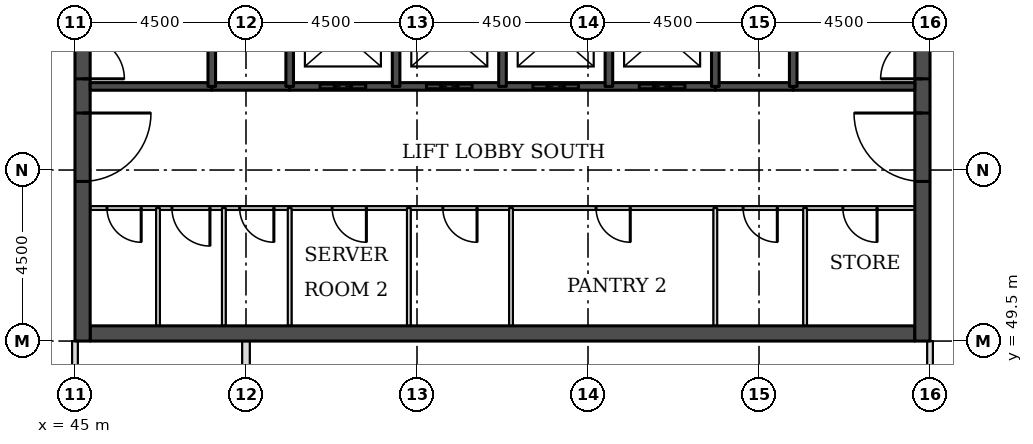
"""IFC4 building model, lengths in metres.
Left out: names, types, materials, properties, quantities, classifications, styles, units other than length and angle.
Written with IfcOpenShell. Run it as: python <this file> out.ifc"""

import sys

from ifc_helpers import new_model, si_unit, direction, frame, frame_2d, origin, place, context, subcontext, project, spatial, rectangle, extrude, element, fill, save


model = new_model("IFC4")
c1 = context("Model", 3, precision=1e-05, world=origin(), true_north=direction((0.0, 1.0)))
c2 = subcontext(c1, "Body", "Model", "MODEL_VIEW")
j1 = project(units=[si_unit("LENGTHUNIT", "METRE"), si_unit("PLANEANGLEUNIT", "RADIAN")], contexts=[c1])
p1 = place(None, origin())
s1 = spatial("IfcSite", under=j1, at=p1, CompositionType="ELEMENT")
p2 = place(p1, origin())
s2 = spatial("IfcBuilding", under=s1, at=p2, CompositionType="ELEMENT")
p3 = place(p2, frame((0.0, 0.0, 256.3)))
s3 = spatial("IfcBuildingStorey", under=s2, at=p3, CompositionType="ELEMENT", Elevation=256.3)
p4 = place(p3, frame((45.4, 49.7, 0.0), z_axis=(0.0, 0.0, 1.0), x_axis=(1.0, 0.0, 0.0)))
e1 = element("IfcWall", 1, at=p4, inside=s3, PredefinedType="SHEAR", context=c2, shape_type="SweptSolid", body=[
    extrude(rectangle(XDim=21.7, YDim=0.4, at=frame_2d((10.85, 0.0))), origin(), (0.0, 0.0, 1.0), 3.7),
])
p5 = place(p3, frame((45.2, 49.5, 0.0), z_axis=(0.0, 0.0, 1.0), x_axis=(0.0, 1.0, 0.0)))
e2 = element("IfcWall", 2, at=p5, inside=s3, PredefinedType="SHEAR", context=c2, shape_type="SweptSolid", body=[
    extrude(rectangle(XDim=22.5, YDim=0.4, at=frame_2d((11.25, 0.0))), origin(), (0.0, 0.0, 1.0), 3.7),
])
p6 = place(p5, frame((4.2, 0.0, 0.0)))
e3 = element("IfcOpeningElement", 3, at=p6, cuts=e2, PredefinedType="OPENING", context=c2, shape_type="SweptSolid", body=[
    extrude(rectangle(XDim=1.8, YDim=2.1, at=frame_2d((0.9, 1.05))), frame((0.0, 0.21, 0.0), z_axis=(0.0, -1.0, 0.0), x_axis=(1.0, 0.0, 0.0)), (0.0, 0.0, 1.0), 0.42),
])
p7 = place(p5, frame((6.9, 0.0, 0.0)))
e4 = element("IfcOpeningElement", 4, at=p7, cuts=e2, PredefinedType="OPENING", context=c2, shape_type="SweptSolid", body=[
    extrude(rectangle(XDim=1.1, YDim=2.1, at=frame_2d((0.55, 1.05))), frame((0.0, 0.21, 0.0), z_axis=(0.0, -1.0, 0.0), x_axis=(1.0, 0.0, 0.0)), (0.0, 0.0, 1.0), 0.42),
])
p8 = place(p5, frame((13.6, 0.0, 0.0)))
e5 = element("IfcOpeningElement", 5, at=p8, cuts=e2, PredefinedType="OPENING", context=c2, shape_type="SweptSolid", body=[
    extrude(rectangle(XDim=1.1, YDim=2.1, at=frame_2d((0.55, 1.05))), frame((0.0, 0.21, 0.0), z_axis=(0.0, -1.0, 0.0), x_axis=(1.0, 0.0, 0.0)), (0.0, 0.0, 1.0), 0.42),
])
p9 = place(p5, frame((16.5, 0.0, 0.0)))
e6 = element("IfcOpeningElement", 6, at=p9, cuts=e2, PredefinedType="OPENING", context=c2, shape_type="SweptSolid", body=[
    extrude(rectangle(XDim=1.8, YDim=2.1, at=frame_2d((0.9, 1.05))), frame((0.0, 0.21, 0.0), z_axis=(0.0, -1.0, 0.0), x_axis=(1.0, 0.0, 0.0)), (0.0, 0.0, 1.0), 0.42),
])
p10 = place(p3, frame((67.3, 49.5, 0.0), z_axis=(0.0, 0.0, 1.0), x_axis=(0.0, 1.0, 0.0)))
e7 = element("IfcWall", 7, at=p10, inside=s3, PredefinedType="SHEAR", context=c2, shape_type="SweptSolid", body=[
    extrude(rectangle(XDim=22.5, YDim=0.4, at=frame_2d((11.25, 0.0))), origin(), (0.0, 0.0, 1.0), 3.7),
])
p11 = place(p10, frame((4.2, 0.0, 0.0)))
e8 = element("IfcOpeningElement", 8, at=p11, cuts=e7, PredefinedType="OPENING", context=c2, shape_type="SweptSolid", body=[
    extrude(rectangle(XDim=1.8, YDim=2.1, at=frame_2d((0.9, 1.05))), frame((0.0, 0.21, 0.0), z_axis=(0.0, -1.0, 0.0), x_axis=(1.0, 0.0, 0.0)), (0.0, 0.0, 1.0), 0.42),
])
p12 = place(p10, frame((6.9, 0.0, 0.0)))
e9 = element("IfcOpeningElement", 9, at=p12, cuts=e7, PredefinedType="OPENING", context=c2, shape_type="SweptSolid", body=[
    extrude(rectangle(XDim=1.1, YDim=2.1, at=frame_2d((0.55, 1.05))), frame((0.0, 0.21, 0.0), z_axis=(0.0, -1.0, 0.0), x_axis=(1.0, 0.0, 0.0)), (0.0, 0.0, 1.0), 0.42),
])
p13 = place(p10, frame((13.6, 0.0, 0.0)))
e10 = element("IfcOpeningElement", 10, at=p13, cuts=e7, PredefinedType="OPENING", context=c2, shape_type="SweptSolid", body=[
    extrude(rectangle(XDim=1.1, YDim=2.1, at=frame_2d((0.55, 1.05))), frame((0.0, 0.21, 0.0), z_axis=(0.0, -1.0, 0.0), x_axis=(1.0, 0.0, 0.0)), (0.0, 0.0, 1.0), 0.42),
])
p14 = place(p10, frame((16.5, 0.0, 0.0)))
e11 = element("IfcOpeningElement", 11, at=p14, cuts=e7, PredefinedType="OPENING", context=c2, shape_type="SweptSolid", body=[
    extrude(rectangle(XDim=1.8, YDim=2.1, at=frame_2d((0.9, 1.05))), frame((0.0, 0.21, 0.0), z_axis=(0.0, -1.0, 0.0), x_axis=(1.0, 0.0, 0.0)), (0.0, 0.0, 1.0), 0.42),
])
p15 = place(p3, frame((45.0, 45.0, 0.0), z_axis=(0.0, 0.0, 1.0), x_axis=(0.0, 1.0, 0.0)))
e12 = element("IfcWall", 12, at=p15, inside=s3, PredefinedType="PARTITIONING", context=c2, shape_type="SweptSolid", body=[
    extrude(rectangle(XDim=4.5, YDim=0.15, at=frame_2d((2.25, 0.0))), origin(), (0.0, 0.0, 1.0), 3.022),
])
p16 = place(p3, frame((49.5, 46.5, 0.0), z_axis=(0.0, 0.0, 1.0), x_axis=(0.0, 1.0, 0.0)))
e13 = element("IfcWall", 13, at=p16, inside=s3, PredefinedType="PARTITIONING", context=c2, shape_type="SweptSolid", body=[
    extrude(rectangle(XDim=3.0, YDim=0.2, at=frame_2d((1.5, 0.0))), origin(), (0.0, 0.0, 1.0), 3.55),
])
p17 = place(p3, frame((67.5, 48.0, 0.0), z_axis=(0.0, 0.0, 1.0), x_axis=(0.0, 1.0, 0.0)))
e14 = element("IfcWall", 14, at=p17, inside=s3, PredefinedType="PARTITIONING", context=c2, shape_type="SweptSolid", body=[
    extrude(rectangle(XDim=1.5, YDim=0.15, at=frame_2d((0.75, 0.0))), origin(), (0.0, 0.0, 1.0), 3.022),
])
p18 = place(p3, frame((45.4, 53.0, 0.0), z_axis=(0.0, 0.0, 1.0), x_axis=(1.0, 0.0, 0.0)))
e15 = element("IfcWall", 15, at=p18, inside=s3, PredefinedType="PARTITIONING", context=c2, shape_type="SweptSolid", body=[
    extrude(rectangle(XDim=21.7, YDim=0.1, at=frame_2d((10.85, 0.0))), origin(), (0.0, 0.0, 1.0), 3.55),
])
p19 = place(p18, frame((19.806, 0.0, 0.0)))
e16 = element("IfcOpeningElement", 16, at=p19, cuts=e15, PredefinedType="OPENING", context=c2, shape_type="SweptSolid", body=[
    extrude(rectangle(XDim=0.9, YDim=2.1, at=frame_2d((0.45, 1.05))), frame((0.0, 0.06, 0.0), z_axis=(0.0, -1.0, 0.0), x_axis=(1.0, 0.0, 0.0)), (0.0, 0.0, 1.0), 0.12),
])
p20 = place(p18, frame((17.181, 0.0, 0.0)))
e17 = element("IfcOpeningElement", 17, at=p20, cuts=e15, PredefinedType="OPENING", context=c2, shape_type="SweptSolid", body=[
    extrude(rectangle(XDim=0.9, YDim=2.1, at=frame_2d((0.45, 1.05))), frame((0.0, 0.06, 0.0), z_axis=(0.0, -1.0, 0.0), x_axis=(1.0, 0.0, 0.0)), (0.0, 0.0, 1.0), 0.12),
])
p21 = place(p18, frame((0.442, 0.0, 0.0)))
e18 = element("IfcOpeningElement", 18, at=p21, cuts=e15, PredefinedType="OPENING", context=c2, shape_type="SweptSolid", body=[
    extrude(rectangle(XDim=0.9, YDim=2.1, at=frame_2d((0.45, 1.05))), frame((0.0, 0.06, 0.0), z_axis=(0.0, -1.0, 0.0), x_axis=(1.0, 0.0, 0.0)), (0.0, 0.0, 1.0), 0.12),
])
p22 = place(p18, frame((2.151, 0.0, 0.0)))
e19 = element("IfcOpeningElement", 19, at=p22, cuts=e15, PredefinedType="OPENING", context=c2, shape_type="SweptSolid", body=[
    extrude(rectangle(XDim=1.0, YDim=2.1, at=frame_2d((0.5, 1.05))), frame((0.0, 0.06, 0.0), z_axis=(0.0, -1.0, 0.0), x_axis=(1.0, 0.0, 0.0)), (0.0, 0.0, 1.0), 0.12),
])
p23 = place(p18, frame((3.934, 0.0, 0.0)))
e20 = element("IfcOpeningElement", 20, at=p23, cuts=e15, PredefinedType="OPENING", context=c2, shape_type="SweptSolid", body=[
    extrude(rectangle(XDim=0.9, YDim=2.1, at=frame_2d((0.45, 1.05))), frame((0.0, 0.06, 0.0), z_axis=(0.0, -1.0, 0.0), x_axis=(1.0, 0.0, 0.0)), (0.0, 0.0, 1.0), 0.12),
])
p24 = place(p18, frame((6.368, 0.0, 0.0)))
e21 = element("IfcOpeningElement", 21, at=p24, cuts=e15, PredefinedType="OPENING", context=c2, shape_type="SweptSolid", body=[
    extrude(rectangle(XDim=0.9, YDim=2.1, at=frame_2d((0.45, 1.05))), frame((0.0, 0.06, 0.0), z_axis=(0.0, -1.0, 0.0), x_axis=(1.0, 0.0, 0.0)), (0.0, 0.0, 1.0), 0.12),
])
p25 = place(p18, frame((9.28, 0.0, 0.0)))
e22 = element("IfcOpeningElement", 22, at=p25, cuts=e15, PredefinedType="OPENING", context=c2, shape_type="SweptSolid", body=[
    extrude(rectangle(XDim=0.9, YDim=2.1, at=frame_2d((0.45, 1.05))), frame((0.0, 0.06, 0.0), z_axis=(0.0, -1.0, 0.0), x_axis=(1.0, 0.0, 0.0)), (0.0, 0.0, 1.0), 0.12),
])
p26 = place(p18, frame((13.312, 0.0, 0.0)))
e23 = element("IfcOpeningElement", 23, at=p26, cuts=e15, PredefinedType="OPENING", context=c2, shape_type="SweptSolid", body=[
    extrude(rectangle(XDim=0.9, YDim=2.1, at=frame_2d((0.45, 1.05))), frame((0.0, 0.06, 0.0), z_axis=(0.0, -1.0, 0.0), x_axis=(1.0, 0.0, 0.0)), (0.0, 0.0, 1.0), 0.12),
])
for number, where, z_axis, x_axis in (
    (24, (48.6, 56.2, 0.0), (0.0, 0.0, 1.0), (1.0, 0.0, 0.0)),
    (25, (61.85, 56.2, 0.0), (0.0, 0.0, 1.0), (1.0, 0.0, 0.0)),
):
    element("IfcWall", number, at=place(p3, frame(where, z_axis=z_axis, x_axis=x_axis)), inside=s3, PredefinedType="SOLIDWALL", context=c2, shape_type="SweptSolid", body=[
        extrude(rectangle(XDim=2.05, YDim=0.2, at=frame_2d((1.025, 0.0))), origin(), (0.0, 0.0, 1.0), 3.55),
    ])
p27 = place(p3, frame((45.4, 56.2, 0.0), z_axis=(0.0, 0.0, 1.0), x_axis=(1.0, 0.0, 0.0)))
e26 = element("IfcWall", 26, at=p27, inside=s3, PredefinedType="SOLIDWALL", context=c2, shape_type="SweptSolid", body=[
    extrude(rectangle(XDim=3.2, YDim=0.2, at=frame_2d((1.6, 0.0))), origin(), (0.0, 0.0, 1.0), 3.55),
])
p28 = place(p3, frame((50.65, 56.2, 0.0), z_axis=(0.0, 0.0, 1.0), x_axis=(1.0, 0.0, 0.0)))
e27 = element("IfcWall", 27, at=p28, inside=s3, PredefinedType="SOLIDWALL", context=c2, shape_type="SweptSolid", body=[
    extrude(rectangle(XDim=11.2, YDim=0.2, at=frame_2d((5.6, 0.0))), origin(), (0.0, 0.0, 1.0), 3.55),
])
p29 = place(p28, frame((0.8, 0.0, 0.0)))
e28 = element("IfcOpeningElement", 28, at=p29, cuts=e27, PredefinedType="OPENING", context=c2, shape_type="SweptSolid", body=[
    extrude(rectangle(XDim=1.2, YDim=2.1, at=frame_2d((0.6, 1.05))), frame((0.0, 0.11, 0.0), z_axis=(0.0, -1.0, 0.0), x_axis=(1.0, 0.0, 0.0)), (0.0, 0.0, 1.0), 0.22),
])
p30 = place(p28, frame((3.6, 0.0, 0.0)))
e29 = element("IfcOpeningElement", 29, at=p30, cuts=e27, PredefinedType="OPENING", context=c2, shape_type="SweptSolid", body=[
    extrude(rectangle(XDim=1.2, YDim=2.1, at=frame_2d((0.6, 1.05))), frame((0.0, 0.11, 0.0), z_axis=(0.0, -1.0, 0.0), x_axis=(1.0, 0.0, 0.0)), (0.0, 0.0, 1.0), 0.22),
])
p31 = place(p28, frame((6.4, 0.0, 0.0)))
e30 = element("IfcOpeningElement", 30, at=p31, cuts=e27, PredefinedType="OPENING", context=c2, shape_type="SweptSolid", body=[
    extrude(rectangle(XDim=1.2, YDim=2.1, at=frame_2d((0.6, 1.05))), frame((0.0, 0.11, 0.0), z_axis=(0.0, -1.0, 0.0), x_axis=(1.0, 0.0, 0.0)), (0.0, 0.0, 1.0), 0.22),
])
p32 = place(p28, frame((9.2, 0.0, 0.0)))
e31 = element("IfcOpeningElement", 31, at=p32, cuts=e27, PredefinedType="OPENING", context=c2, shape_type="SweptSolid", body=[
    extrude(rectangle(XDim=1.2, YDim=2.1, at=frame_2d((0.6, 1.05))), frame((0.0, 0.11, 0.0), z_axis=(0.0, -1.0, 0.0), x_axis=(1.0, 0.0, 0.0)), (0.0, 0.0, 1.0), 0.22),
])
p33 = place(p3, frame((63.9, 56.2, 0.0), z_axis=(0.0, 0.0, 1.0), x_axis=(1.0, 0.0, 0.0)))
e32 = element("IfcWall", 32, at=p33, inside=s3, PredefinedType="SOLIDWALL", context=c2, shape_type="SweptSolid", body=[
    extrude(rectangle(XDim=3.2, YDim=0.2, at=frame_2d((1.6, 0.0))), origin(), (0.0, 0.0, 1.0), 3.55),
])
p34 = place(p3, frame((47.185, 49.9, 0.0), z_axis=(0.0, 0.0, 1.0), x_axis=(0.0, 1.0, 0.0)))
e33 = element("IfcWall", 33, at=p34, inside=s3, PredefinedType="PARTITIONING", context=c2, shape_type="SweptSolid", body=[
    extrude(rectangle(XDim=3.1, YDim=0.1, at=frame_2d((1.55, 0.0))), origin(), (0.0, 0.0, 1.0), 3.55),
])
p35 = place(p3, frame((48.6, 56.2, 0.0), z_axis=(0.0, 0.0, 1.0), x_axis=(0.0, 1.0, 0.0)))
e34 = element("IfcWall", 34, at=p35, inside=s3, PredefinedType="SOLIDWALL", context=c2, shape_type="SweptSolid", body=[
    extrude(rectangle(XDim=5.8, YDim=0.2, at=frame_2d((2.9, 0.0))), origin(), (0.0, 0.0, 1.0), 3.55),
])
for number, where, z_axis, x_axis in (
    (35, (48.917, 49.9, 0.0), (0.0, 0.0, 1.0), (0.0, 1.0, 0.0)),
    (36, (50.65, 49.9, 0.0), (0.0, 0.0, 1.0), (0.0, 1.0, 0.0)),
):
    element("IfcWall", number, at=place(p3, frame(where, z_axis=z_axis, x_axis=x_axis)), inside=s3, PredefinedType="PARTITIONING", context=c2, shape_type="SweptSolid", body=[
        extrude(rectangle(XDim=3.1, YDim=0.1, at=frame_2d((1.55, 0.0))), origin(), (0.0, 0.0, 1.0), 3.55),
    ])
for number, where, z_axis, x_axis in (
    (37, (50.65, 56.2, 0.0), (0.0, 0.0, 1.0), (0.0, 1.0, 0.0)),
    (38, (53.45, 56.2, 0.0), (0.0, 0.0, 1.0), (0.0, 1.0, 0.0)),
):
    element("IfcWall", number, at=place(p3, frame(where, z_axis=z_axis, x_axis=x_axis)), inside=s3, PredefinedType="SOLIDWALL", context=c2, shape_type="SweptSolid", body=[
        extrude(rectangle(XDim=2.8, YDim=0.2, at=frame_2d((1.4, 0.0))), origin(), (0.0, 0.0, 1.0), 3.55),
    ])
p36 = place(p3, frame((53.786, 49.9, 0.0), z_axis=(0.0, 0.0, 1.0), x_axis=(0.0, 1.0, 0.0)))
e39 = element("IfcWall", 39, at=p36, inside=s3, PredefinedType="PARTITIONING", context=c2, shape_type="SweptSolid", body=[
    extrude(rectangle(XDim=3.1, YDim=0.1, at=frame_2d((1.55, 0.0))), origin(), (0.0, 0.0, 1.0), 3.55),
])
p37 = place(p3, frame((56.25, 56.2, 0.0), z_axis=(0.0, 0.0, 1.0), x_axis=(0.0, 1.0, 0.0)))
e40 = element("IfcWall", 40, at=p37, inside=s3, PredefinedType="SOLIDWALL", context=c2, shape_type="SweptSolid", body=[
    extrude(rectangle(XDim=2.8, YDim=0.2, at=frame_2d((1.4, 0.0))), origin(), (0.0, 0.0, 1.0), 3.55),
])
p38 = place(p3, frame((56.474, 49.9, 0.0), z_axis=(0.0, 0.0, 1.0), x_axis=(0.0, 1.0, 0.0)))
e41 = element("IfcWall", 41, at=p38, inside=s3, PredefinedType="PARTITIONING", context=c2, shape_type="SweptSolid", body=[
    extrude(rectangle(XDim=3.1, YDim=0.1, at=frame_2d((1.55, 0.0))), origin(), (0.0, 0.0, 1.0), 3.55),
])
p39 = place(p3, frame((59.05, 56.2, 0.0), z_axis=(0.0, 0.0, 1.0), x_axis=(0.0, 1.0, 0.0)))
e42 = element("IfcWall", 42, at=p39, inside=s3, PredefinedType="SOLIDWALL", context=c2, shape_type="SweptSolid", body=[
    extrude(rectangle(XDim=2.8, YDim=0.2, at=frame_2d((1.4, 0.0))), origin(), (0.0, 0.0, 1.0), 3.55),
])
p40 = place(p3, frame((61.85, 49.9, 0.0), z_axis=(0.0, 0.0, 1.0), x_axis=(0.0, 1.0, 0.0)))
e43 = element("IfcWall", 43, at=p40, inside=s3, PredefinedType="PARTITIONING", context=c2, shape_type="SweptSolid", body=[
    extrude(rectangle(XDim=3.1, YDim=0.1, at=frame_2d((1.55, 0.0))), origin(), (0.0, 0.0, 1.0), 3.55),
])
p41 = place(p3, frame((61.85, 56.2, 0.0), z_axis=(0.0, 0.0, 1.0), x_axis=(0.0, 1.0, 0.0)))
e44 = element("IfcWall", 44, at=p41, inside=s3, PredefinedType="SOLIDWALL", context=c2, shape_type="SweptSolid", body=[
    extrude(rectangle(XDim=2.8, YDim=0.2, at=frame_2d((1.4, 0.0))), origin(), (0.0, 0.0, 1.0), 3.55),
])
p42 = place(p3, frame((63.9, 56.2, 0.0), z_axis=(0.0, 0.0, 1.0), x_axis=(0.0, 1.0, 0.0)))
e45 = element("IfcWall", 45, at=p42, inside=s3, PredefinedType="SOLIDWALL", context=c2, shape_type="SweptSolid", body=[
    extrude(rectangle(XDim=5.8, YDim=0.2, at=frame_2d((2.9, 0.0))), origin(), (0.0, 0.0, 1.0), 3.55),
])
p43 = place(p3, frame((64.212, 49.9, 0.0), z_axis=(0.0, 0.0, 1.0), x_axis=(0.0, 1.0, 0.0)))
e46 = element("IfcWall", 46, at=p43, inside=s3, PredefinedType="PARTITIONING", context=c2, shape_type="SweptSolid", body=[
    extrude(rectangle(XDim=3.1, YDim=0.1, at=frame_2d((1.55, 0.0))), origin(), (0.0, 0.0, 1.0), 3.55),
])
p44 = place(p29, origin())
e47 = element("IfcDoor", 47, at=p44, inside=s3, OperationType="DOUBLE_DOOR_SLIDING", PredefinedType="DOOR", context=c2, shape_type="SweptSolid", body=[
    extrude(rectangle(XDim=1.2, YDim=2.1, at=frame_2d((0.6, 1.05))), frame((0.0, 0.025, 0.0), z_axis=(0.0, -1.0, 0.0), x_axis=(1.0, 0.0, 0.0)), (0.0, 0.0, 1.0), 0.05),
])
fill(e28, e47)
p45 = place(p30, origin())
e48 = element("IfcDoor", 48, at=p45, inside=s3, OperationType="DOUBLE_DOOR_SLIDING", PredefinedType="DOOR", context=c2, shape_type="SweptSolid", body=[
    extrude(rectangle(XDim=1.2, YDim=2.1, at=frame_2d((0.6, 1.05))), frame((0.0, 0.025, 0.0), z_axis=(0.0, -1.0, 0.0), x_axis=(1.0, 0.0, 0.0)), (0.0, 0.0, 1.0), 0.05),
])
fill(e29, e48)
p46 = place(p31, origin())
e49 = element("IfcDoor", 49, at=p46, inside=s3, OperationType="DOUBLE_DOOR_SLIDING", PredefinedType="DOOR", context=c2, shape_type="SweptSolid", body=[
    extrude(rectangle(XDim=1.2, YDim=2.1, at=frame_2d((0.6, 1.05))), frame((0.0, 0.025, 0.0), z_axis=(0.0, -1.0, 0.0), x_axis=(1.0, 0.0, 0.0)), (0.0, 0.0, 1.0), 0.05),
])
fill(e30, e49)
p47 = place(p32, origin())
e50 = element("IfcDoor", 50, at=p47, inside=s3, OperationType="DOUBLE_DOOR_SLIDING", PredefinedType="DOOR", context=c2, shape_type="SweptSolid", body=[
    extrude(rectangle(XDim=1.2, YDim=2.1, at=frame_2d((0.6, 1.05))), frame((0.0, 0.025, 0.0), z_axis=(0.0, -1.0, 0.0), x_axis=(1.0, 0.0, 0.0)), (0.0, 0.0, 1.0), 0.05),
])
fill(e31, e50)
p48 = place(p6, frame((1.8, 0.0, 0.0), z_axis=(0.0, 0.0, 1.0), x_axis=(-1.0, 0.0, 0.0)))
e51 = element("IfcDoor", 51, at=p48, inside=s3, OperationType="SINGLE_SWING_LEFT", PredefinedType="DOOR", context=c2, shape_type="SweptSolid", body=[
    extrude(rectangle(XDim=1.8, YDim=2.1, at=frame_2d((0.9, 1.05))), frame((0.0, 0.025, 0.0), z_axis=(0.0, -1.0, 0.0), x_axis=(1.0, 0.0, 0.0)), (0.0, 0.0, 1.0), 0.05),
])
fill(e3, e51)
p49 = place(p7, frame((1.1, 0.0, 0.0), z_axis=(0.0, 0.0, 1.0), x_axis=(-1.0, 0.0, 0.0)))
e52 = element("IfcDoor", 52, at=p49, inside=s3, OperationType="SINGLE_SWING_RIGHT", PredefinedType="DOOR", context=c2, shape_type="SweptSolid", body=[
    extrude(rectangle(XDim=1.1, YDim=2.1, at=frame_2d((0.55, 1.05))), frame((0.0, 0.025, 0.0), z_axis=(0.0, -1.0, 0.0), x_axis=(1.0, 0.0, 0.0)), (0.0, 0.0, 1.0), 0.05),
])
fill(e4, e52)
p50 = place(p11, origin())
e53 = element("IfcDoor", 53, at=p50, inside=s3, OperationType="SINGLE_SWING_RIGHT", PredefinedType="DOOR", context=c2, shape_type="SweptSolid", body=[
    extrude(rectangle(XDim=1.8, YDim=2.1, at=frame_2d((0.9, 1.05))), frame((0.0, 0.025, 0.0), z_axis=(0.0, -1.0, 0.0), x_axis=(1.0, 0.0, 0.0)), (0.0, 0.0, 1.0), 0.05),
])
fill(e8, e53)
p51 = place(p12, origin())
e54 = element("IfcDoor", 54, at=p51, inside=s3, OperationType="SINGLE_SWING_LEFT", PredefinedType="DOOR", context=c2, shape_type="SweptSolid", body=[
    extrude(rectangle(XDim=1.1, YDim=2.1, at=frame_2d((0.55, 1.05))), frame((0.0, 0.025, 0.0), z_axis=(0.0, -1.0, 0.0), x_axis=(1.0, 0.0, 0.0)), (0.0, 0.0, 1.0), 0.05),
])
fill(e9, e54)
p52 = place(p19, frame((0.9, 0.0, 0.0), z_axis=(0.0, 0.0, 1.0), x_axis=(-1.0, 0.0, 0.0)))
e55 = element("IfcDoor", 55, at=p52, inside=s3, OperationType="SINGLE_SWING_LEFT", PredefinedType="DOOR", context=c2, shape_type="SweptSolid", body=[
    extrude(rectangle(XDim=0.9, YDim=2.1, at=frame_2d((0.45, 1.05))), frame((0.0, 0.025, 0.0), z_axis=(0.0, -1.0, 0.0), x_axis=(1.0, 0.0, 0.0)), (0.0, 0.0, 1.0), 0.05),
])
fill(e16, e55)
p53 = place(p20, frame((0.9, 0.0, 0.0), z_axis=(0.0, 0.0, 1.0), x_axis=(-1.0, 0.0, 0.0)))
e56 = element("IfcDoor", 56, at=p53, inside=s3, OperationType="SINGLE_SWING_LEFT", PredefinedType="DOOR", context=c2, shape_type="SweptSolid", body=[
    extrude(rectangle(XDim=0.9, YDim=2.1, at=frame_2d((0.45, 1.05))), frame((0.0, 0.025, 0.0), z_axis=(0.0, -1.0, 0.0), x_axis=(1.0, 0.0, 0.0)), (0.0, 0.0, 1.0), 0.05),
])
fill(e17, e56)
p54 = place(p21, frame((0.9, 0.0, 0.0), z_axis=(0.0, 0.0, 1.0), x_axis=(-1.0, 0.0, 0.0)))
e57 = element("IfcDoor", 57, at=p54, inside=s3, OperationType="SINGLE_SWING_LEFT", PredefinedType="DOOR", context=c2, shape_type="SweptSolid", body=[
    extrude(rectangle(XDim=0.9, YDim=2.1, at=frame_2d((0.45, 1.05))), frame((0.0, 0.025, 0.0), z_axis=(0.0, -1.0, 0.0), x_axis=(1.0, 0.0, 0.0)), (0.0, 0.0, 1.0), 0.05),
])
fill(e18, e57)
p55 = place(p22, frame((1.0, 0.0, 0.0), z_axis=(0.0, 0.0, 1.0), x_axis=(-1.0, 0.0, 0.0)))
e58 = element("IfcDoor", 58, at=p55, inside=s3, OperationType="SINGLE_SWING_LEFT", PredefinedType="DOOR", context=c2, shape_type="SweptSolid", body=[
    extrude(rectangle(XDim=1.0, YDim=2.1, at=frame_2d((0.5, 1.05))), frame((0.0, 0.025, 0.0), z_axis=(0.0, -1.0, 0.0), x_axis=(1.0, 0.0, 0.0)), (0.0, 0.0, 1.0), 0.05),
])
fill(e19, e58)
p56 = place(p23, frame((0.9, 0.0, 0.0), z_axis=(0.0, 0.0, 1.0), x_axis=(-1.0, 0.0, 0.0)))
e59 = element("IfcDoor", 59, at=p56, inside=s3, OperationType="SINGLE_SWING_LEFT", PredefinedType="DOOR", context=c2, shape_type="SweptSolid", body=[
    extrude(rectangle(XDim=0.9, YDim=2.1, at=frame_2d((0.45, 1.05))), frame((0.0, 0.025, 0.0), z_axis=(0.0, -1.0, 0.0), x_axis=(1.0, 0.0, 0.0)), (0.0, 0.0, 1.0), 0.05),
])
fill(e20, e59)
p57 = place(p24, frame((0.9, 0.0, 0.0), z_axis=(0.0, 0.0, 1.0), x_axis=(-1.0, 0.0, 0.0)))
e60 = element("IfcDoor", 60, at=p57, inside=s3, OperationType="SINGLE_SWING_LEFT", PredefinedType="DOOR", context=c2, shape_type="SweptSolid", body=[
    extrude(rectangle(XDim=0.9, YDim=2.1, at=frame_2d((0.45, 1.05))), frame((0.0, 0.025, 0.0), z_axis=(0.0, -1.0, 0.0), x_axis=(1.0, 0.0, 0.0)), (0.0, 0.0, 1.0), 0.05),
])
fill(e21, e60)
p58 = place(p25, frame((0.9, 0.0, 0.0), z_axis=(0.0, 0.0, 1.0), x_axis=(-1.0, 0.0, 0.0)))
e61 = element("IfcDoor", 61, at=p58, inside=s3, OperationType="SINGLE_SWING_LEFT", PredefinedType="DOOR", context=c2, shape_type="SweptSolid", body=[
    extrude(rectangle(XDim=0.9, YDim=2.1, at=frame_2d((0.45, 1.05))), frame((0.0, 0.025, 0.0), z_axis=(0.0, -1.0, 0.0), x_axis=(1.0, 0.0, 0.0)), (0.0, 0.0, 1.0), 0.05),
])
fill(e22, e61)
p59 = place(p26, frame((0.9, 0.0, 0.0), z_axis=(0.0, 0.0, 1.0), x_axis=(-1.0, 0.0, 0.0)))
e62 = element("IfcDoor", 62, at=p59, inside=s3, OperationType="SINGLE_SWING_LEFT", PredefinedType="DOOR", context=c2, shape_type="SweptSolid", body=[
    extrude(rectangle(XDim=0.9, YDim=2.1, at=frame_2d((0.45, 1.05))), frame((0.0, 0.025, 0.0), z_axis=(0.0, -1.0, 0.0), x_axis=(1.0, 0.0, 0.0)), (0.0, 0.0, 1.0), 0.05),
])
fill(e23, e62)
save(model, sys.argv[1])
